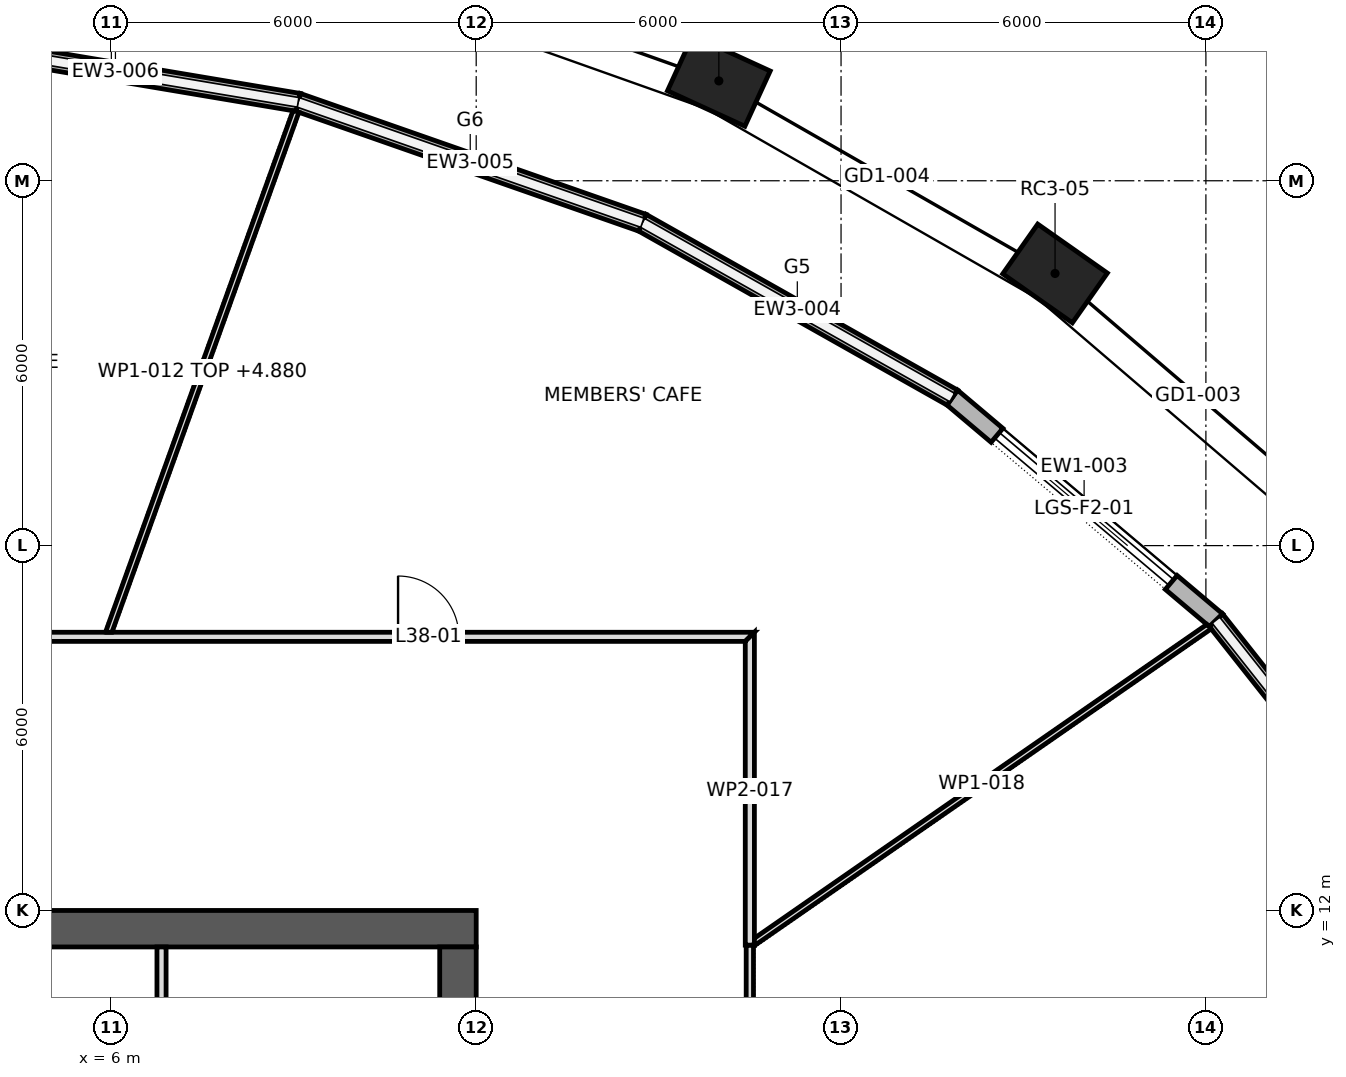
"""IFC4 building model, lengths in metres.
Left out: names, types, materials, properties, quantities, classifications, styles, units other than length and angle.
Written with IfcOpenShell. Run it as: python <this file> out.ifc"""

import sys

from ifc_helpers import new_model, si_unit, direction, frame, frame_2d, origin, origin_2d, place, context, subcontext, project, spatial, polyline, rectangle, outline, extrude, element, fill, save


model = new_model("IFC4")
c1 = context("Model", 3, precision=1e-05, world=origin(), true_north=direction((0.0, 1.0)))
c2 = subcontext(c1, "Body", "Model", "MODEL_VIEW")
j1 = project(units=[si_unit("LENGTHUNIT", "METRE"), si_unit("PLANEANGLEUNIT", "RADIAN")], contexts=[c1])
p1 = place(None, origin())
s1 = spatial("IfcSite", under=j1, at=p1, CompositionType="ELEMENT")
p2 = place(p1, origin())
s2 = spatial("IfcBuilding", under=s1, at=p2, CompositionType="ELEMENT")
p3 = place(p2, frame((0.0, 0.0, 167.5)))
s3 = spatial("IfcBuildingStorey", under=s2, at=p3, CompositionType="ELEMENT", Elevation=167.5)
for number, where, z_axis, x_axis in (
    (1, (21.519, 22.475, 0.0), (0.0, 0.0, 1.0), (-0.818, 0.575, 0.0)),
    (2, (15.99, 25.642, 0.0), (0.0, 0.0, 1.0), (-0.909, 0.417, 0.0)),
):
    element("IfcColumn", number, at=place(p3, frame(where, z_axis=z_axis, x_axis=x_axis)), inside=s3, PredefinedType="COLUMN", context=c2, shape_type="SweptSolid", body=[
        extrude(rectangle(XDim=1.4, YDim=1.0, at=origin_2d()), origin(), (0.0, 0.0, 1.0), 6.0),
    ])
p4 = place(p3, frame((-12.0, 11.7, 0.0), z_axis=(0.0, 0.0, 1.0), x_axis=(1.0, 0.0, 0.0)))
e3 = element("IfcWall", 3, at=p4, inside=s3, PredefinedType="SHEAR", context=c2, shape_type="SweptSolid", body=[
    extrude(rectangle(XDim=24.0, YDim=0.6, at=frame_2d((12.0, 0.0))), origin(), (0.0, 0.0, 1.0), 6.0),
])
p5 = place(p4, frame((9.025, 0.0, 0.0)))
e4 = element("IfcOpeningElement", 4, at=p5, cuts=e3, PredefinedType="OPENING", context=c2, shape_type="SweptSolid", body=[
    extrude(rectangle(XDim=0.9, YDim=2.1, at=frame_2d((0.45, 1.05))), frame((0.0, 0.312, 0.0), z_axis=(0.0, -1.0, 0.0), x_axis=(1.0, 0.0, 0.0)), (0.0, 0.0, 1.0), 0.624),
])
p6 = place(p4, frame((10.675, 0.0, 0.0)))
e5 = element("IfcOpeningElement", 5, at=p6, cuts=e3, PredefinedType="OPENING", context=c2, shape_type="SweptSolid", body=[
    extrude(rectangle(XDim=0.9, YDim=2.1, at=frame_2d((0.45, 1.05))), frame((0.0, 0.312, 0.0), z_axis=(0.0, -1.0, 0.0), x_axis=(1.0, 0.0, 0.0)), (0.0, 0.0, 1.0), 0.624),
])
p7 = place(p4, frame((4.6, 0.0, 0.0)))
e6 = element("IfcOpeningElement", 6, at=p7, cuts=e3, PredefinedType="OPENING", context=c2, shape_type="SweptSolid", body=[
    extrude(rectangle(XDim=0.8, YDim=2.1, at=frame_2d((0.4, 1.05))), frame((0.0, 0.312, 0.0), z_axis=(0.0, -1.0, 0.0), x_axis=(1.0, 0.0, 0.0)), (0.0, 0.0, 1.0), 0.624),
])
p8 = place(p4, frame((7.0, 0.0, 0.0)))
e7 = element("IfcOpeningElement", 7, at=p8, cuts=e3, PredefinedType="OPENING", context=c2, shape_type="SweptSolid", body=[
    extrude(rectangle(XDim=0.8, YDim=2.1, at=frame_2d((0.4, 1.05))), frame((0.0, 0.312, 0.0), z_axis=(0.0, -1.0, 0.0), x_axis=(1.0, 0.0, 0.0)), (0.0, 0.0, 1.0), 0.624),
])
p9 = place(p4, frame((15.85, 0.0, 0.0)))
e8 = element("IfcOpeningElement", 8, at=p9, cuts=e3, PredefinedType="OPENING", context=c2, shape_type="SweptSolid", body=[
    extrude(rectangle(XDim=0.8, YDim=2.1, at=frame_2d((0.4, 1.05))), frame((0.0, 0.312, 0.0), z_axis=(0.0, -1.0, 0.0), x_axis=(1.0, 0.0, 0.0)), (0.0, 0.0, 1.0), 0.624),
])
p10 = place(p3, frame((11.7, -11.4, 0.0), z_axis=(0.0, 0.0, 1.0), x_axis=(0.0, 1.0, 0.0)))
e9 = element("IfcWall", 9, at=p10, inside=s3, PredefinedType="SHEAR", context=c2, shape_type="SweptSolid", body=[
    extrude(rectangle(XDim=22.8, YDim=0.6, at=frame_2d((11.4, 0.0))), origin(), (0.0, 0.0, 1.0), 6.0),
])
p11 = place(p10, frame((10.2, 0.0, 0.0)))
e10 = element("IfcOpeningElement", 10, at=p11, cuts=e9, PredefinedType="OPENING", context=c2, shape_type="SweptSolid", body=[
    extrude(rectangle(XDim=2.4, YDim=2.1, at=frame_2d((1.2, 1.05))), frame((0.0, 0.312, 0.0), z_axis=(0.0, -1.0, 0.0), x_axis=(1.0, 0.0, 0.0)), (0.0, 0.0, 1.0), 0.624),
])
p12 = place(p10, frame((19.5, 0.0, 0.0)))
e11 = element("IfcOpeningElement", 11, at=p12, cuts=e9, PredefinedType="OPENING", context=c2, shape_type="SweptSolid", body=[
    extrude(rectangle(XDim=1.2, YDim=2.1, at=frame_2d((0.6, 1.05))), frame((0.0, 0.312, 0.0), z_axis=(0.0, -1.0, 0.0), x_axis=(1.0, 0.0, 0.0)), (0.0, 0.0, 1.0), 0.624),
])
p13 = place(p10, frame((2.1, 0.0, 0.0)))
e12 = element("IfcOpeningElement", 12, at=p13, cuts=e9, PredefinedType="OPENING", context=c2, shape_type="SweptSolid", body=[
    extrude(rectangle(XDim=1.2, YDim=2.1, at=frame_2d((0.6, 1.05))), frame((0.0, 0.312, 0.0), z_axis=(0.0, -1.0, 0.0), x_axis=(1.0, 0.0, 0.0)), (0.0, 0.0, 1.0), 0.624),
])
p14 = place(p3, frame((27.574, 12.467, 5.2), z_axis=(0.0, 0.0, 1.0), x_axis=(-0.620577705153, 0.784144955902, 0.0)))
e13 = element("IfcWall", 13, at=p14, inside=s3, PredefinedType="STANDARD", context=c2, shape_type="SweptSolid", body=[
    extrude(outline(polyline([(-0.016, -0.15), (5.508, -0.15), (5.478, 0.15), (0.016, 0.15), (-0.016, -0.15)])), origin(), (0.0, 0.0, 1.0), 0.45),
])
p15 = place(p3, frame((24.165, 16.774, 0.0), z_axis=(0.0, 0.0, 1.0), x_axis=(-0.764076096085, 0.645126126732, 0.0)))
e14 = element("IfcWall", 14, at=p15, inside=s3, PredefinedType="STANDARD", context=c2, shape_type="SweptSolid", body=[
    extrude(outline(polyline([(-0.015, -0.15), (5.689, -0.15), (5.661, 0.15), (0.015, 0.15), (-0.015, -0.15)])), origin(), (0.0, 0.0, 1.0), 5.65),
])
p16 = place(p15, frame((0.962, 0.0, 0.0)))
e15 = element("IfcOpeningElement", 15, at=p16, cuts=e14, PredefinedType="OPENING", context=c2, shape_type="SweptSolid", body=[
    extrude(rectangle(XDim=3.75, YDim=5.2, at=frame_2d((1.875, 2.6))), frame((0.0, 0.162, 0.0), z_axis=(0.0, -1.0, 0.0), x_axis=(1.0, 0.0, 0.0)), (0.0, 0.0, 1.0), 0.324),
])
p17 = place(p3, frame((19.829, 20.435, 5.2), z_axis=(0.0, 0.0, 1.0), x_axis=(-0.870982130072, 0.491314694565, 0.0)))
e16 = element("IfcWall", 16, at=p17, inside=s3, PredefinedType="STANDARD", context=c2, shape_type="SweptSolid", body=[
    extrude(outline(polyline([(-0.014, -0.15), (5.865, -0.15), (5.838, 0.15), (0.014, 0.15), (-0.014, -0.15)])), origin(), (0.0, 0.0, 1.0), 0.45),
])
p18 = place(p3, frame((14.732, 23.31, 5.2), z_axis=(0.0, 0.0, 1.0), x_axis=(-0.943944636678, 0.330103806228, 0.0)))
e17 = element("IfcWall", 17, at=p18, inside=s3, PredefinedType="STANDARD", context=c2, shape_type="SweptSolid", body=[
    extrude(outline(polyline([(-0.013, -0.15), (6.01, -0.15), (5.985, 0.15), (0.013, 0.15), (-0.013, -0.15)])), origin(), (0.0, 0.0, 1.0), 0.45),
])
p19 = place(p3, frame((9.071, 25.29, 5.2), z_axis=(0.0, 0.0, 1.0), x_axis=(-0.98618955457, 0.165620537547, 0.0)))
e18 = element("IfcWall", 18, at=p19, inside=s3, PredefinedType="STANDARD", context=c2, shape_type="SweptSolid", body=[
    extrude(outline(polyline([(-0.013, -0.15), (6.105, -0.15), (6.08, 0.15), (0.013, 0.15), (-0.013, -0.15)])), origin(), (0.0, 0.0, 1.0), 0.45),
])
p20 = place(p3, frame((6.825, 9.9, 0.0), z_axis=(0.0, 0.0, 1.0), x_axis=(0.0, 1.0, 0.0)))
e19 = element("IfcWall", 19, at=p20, inside=s3, PredefinedType="PARTITIONING", context=c2, shape_type="SweptSolid", body=[
    extrude(rectangle(XDim=1.5, YDim=0.15, at=frame_2d((0.75, 0.0))), origin(), (0.0, 0.0, 1.0), 5.65),
])
p21 = place(p3, frame((-16.575, 16.5, 0.0), z_axis=(0.0, 0.0, 1.0), x_axis=(1.0, 0.0, 0.0)))
e20 = element("IfcWall", 20, at=p21, inside=s3, PredefinedType="PARTITIONING", context=c2, shape_type="SweptSolid", body=[
    extrude(outline(polyline([(0.15, -0.075), (2.082, -0.075), (4.015, -0.075), (5.947, -0.075), (7.879, -0.075), (9.812, -0.075), (11.744, -0.075), (13.677, -0.075), (15.609, -0.075), (17.541, -0.075), (19.473, -0.075), (21.406, -0.075), (23.338, -0.075), (25.271, -0.075), (27.203, -0.075), (29.135, -0.075), (31.068, -0.075), (33.0, -0.075), (33.15, 0.075), (31.2, 0.075), (29.25, 0.075), (27.3, 0.075), (25.35, 0.075), (23.4, 0.075), (21.45, 0.075), (19.5, 0.075), (17.55, 0.075), (15.6, 0.075), (13.65, 0.075), (11.7, 0.075), (9.75, 0.075), (7.8, 0.075), (5.85, 0.075), (3.9, 0.075), (1.95, 0.075), (0.0, 0.075), (0.15, -0.075)])), origin(), (0.0, 0.0, 1.0), 5.65),
])
p22 = place(p21, frame((27.29, 0.0, 0.0)))
e21 = element("IfcOpeningElement", 21, at=p22, cuts=e20, PredefinedType="OPENING", context=c2, shape_type="SweptSolid", body=[
    extrude(rectangle(XDim=1.0, YDim=2.1, at=frame_2d((0.5, 1.05))), frame((0.0, 0.087, 0.0), z_axis=(0.0, -1.0, 0.0), x_axis=(1.0, 0.0, 0.0)), (0.0, 0.0, 1.0), 0.174),
])
p23 = place(p21, frame((16.075, 0.0, 0.0)))
e22 = element("IfcOpeningElement", 22, at=p23, cuts=e20, PredefinedType="OPENING", context=c2, shape_type="SweptSolid", body=[
    extrude(rectangle(XDim=1.0, YDim=2.1, at=frame_2d((0.5, 1.05))), frame((0.0, 0.087, 0.0), z_axis=(0.0, -1.0, 0.0), x_axis=(1.0, 0.0, 0.0)), (0.0, 0.0, 1.0), 0.174),
])
p24 = place(p21, frame((5.09, 0.0, 0.0)))
e23 = element("IfcOpeningElement", 23, at=p24, cuts=e20, PredefinedType="OPENING", context=c2, shape_type="SweptSolid", body=[
    extrude(rectangle(XDim=1.0, YDim=2.1, at=frame_2d((0.5, 1.05))), frame((0.0, 0.087, 0.0), z_axis=(0.0, -1.0, 0.0), x_axis=(1.0, 0.0, 0.0)), (0.0, 0.0, 1.0), 0.174),
])
p25 = place(p3, frame((5.951, 16.558, 0.0), z_axis=(0.0, 0.0, 1.0), x_axis=(0.338285385043, 0.94104356874, 0.0)))
e24 = element("IfcWall", 24, at=p25, inside=s3, PredefinedType="PARTITIONING", context=c2, shape_type="SweptSolid", body=[
    extrude(outline(polyline([(9.122, -0.05), (9.122, -0.006), (9.122, 0.003), (9.114, 0.05), (7.291, 0.05), (5.468, 0.05), (3.646, 0.05), (1.823, 0.05), (0.0, 0.05), (0.0, 0.049), (0.036, -0.05), (1.853, -0.05), (3.67, -0.05), (5.488, -0.05), (7.305, -0.05), (9.122, -0.05)])), origin(), (0.0, 0.0, 1.0), 4.88),
])
p26 = place(p3, frame((16.5, -7.45, 0.0), z_axis=(0.0, 0.0, 1.0), x_axis=(0.0, 1.0, 0.0)))
e25 = element("IfcWall", 25, at=p26, inside=s3, PredefinedType="PARTITIONING", context=c2, shape_type="SweptSolid", body=[
    extrude(rectangle(XDim=18.88, YDim=0.12, at=frame_2d((9.44, 0.0))), origin(), (0.0, 0.0, 1.0), 5.65),
])
p27 = place(p26, frame((3.51, 0.0, 0.0)))
e26 = element("IfcOpeningElement", 26, at=p27, cuts=e25, PredefinedType="OPENING", context=c2, shape_type="SweptSolid", body=[
    extrude(rectangle(XDim=1.8, YDim=2.1, at=frame_2d((0.9, 1.05))), frame((0.0, 0.072, 0.0), z_axis=(0.0, -1.0, 0.0), x_axis=(1.0, 0.0, 0.0)), (0.0, 0.0, 1.0), 0.144),
])
p28 = place(p26, frame((12.95, 0.0, 0.0)))
e27 = element("IfcOpeningElement", 27, at=p28, cuts=e25, PredefinedType="OPENING", context=c2, shape_type="SweptSolid", body=[
    extrude(rectangle(XDim=1.8, YDim=2.1, at=frame_2d((0.9, 1.05))), frame((0.0, 0.072, 0.0), z_axis=(0.0, -1.0, 0.0), x_axis=(1.0, 0.0, 0.0)), (0.0, 0.0, 1.0), 0.144),
])
p29 = place(p3, frame((16.5, 16.575, 0.0), z_axis=(0.0, 0.0, 1.0), x_axis=(0.0, -1.0, 0.0)))
e28 = element("IfcWall", 28, at=p29, inside=s3, PredefinedType="PARTITIONING", context=c2, shape_type="SweptSolid", body=[
    extrude(outline(polyline([(5.145, 0.075), (3.43, 0.075), (1.715, 0.075), (0.0, 0.075), (0.15, -0.075), (1.815, -0.075), (3.48, -0.075), (5.145, -0.075), (5.145, 0.075)])), origin(), (0.0, 0.0, 1.0), 5.65),
])
p30 = place(p3, frame((24.058, 16.672, 0.0), z_axis=(0.0, 0.0, 1.0), x_axis=(-0.821707329214, -0.56990969909, 0.0)))
e29 = element("IfcWall", 29, at=p30, inside=s3, PredefinedType="PARTITIONING", context=c2, shape_type="SweptSolid", body=[
    extrude(outline(polyline([(0.017, -0.05), (1.828, -0.05), (3.639, -0.05), (5.45, -0.05), (7.261, -0.05), (9.072, -0.05), (9.136, 0.043), (9.149, 0.034), (9.16, 0.05), (9.16, 0.05), (7.328, 0.05), (5.496, 0.05), (3.664, 0.05), (1.832, 0.05), (0.0, 0.05), (0.0, 0.048), (0.003, 0.002), (0.017, -0.05)])), origin(), (0.0, 0.0, 1.0), 5.65),
])
p31 = place(p16, origin())
e30 = element("IfcDoor", 30, at=p31, inside=s3, OperationType="DOUBLE_DOOR_SLIDING", PredefinedType="DOOR", context=c2, shape_type="SweptSolid", body=[
    extrude(rectangle(XDim=3.75, YDim=5.2, at=frame_2d((1.875, 2.6))), frame((0.0, 0.025, 0.0), z_axis=(0.0, -1.0, 0.0), x_axis=(1.0, 0.0, 0.0)), (0.0, 0.0, 1.0), 0.05),
])
fill(e15, e30)
p32 = place(p22, origin())
e31 = element("IfcDoor", 31, at=p32, inside=s3, OperationType="SINGLE_SWING_RIGHT", PredefinedType="DOOR", context=c2, shape_type="SweptSolid", body=[
    extrude(rectangle(XDim=1.0, YDim=2.1, at=frame_2d((0.5, 1.05))), frame((0.0, 0.025, 0.0), z_axis=(0.0, -1.0, 0.0), x_axis=(1.0, 0.0, 0.0)), (0.0, 0.0, 1.0), 0.05),
])
fill(e21, e31)
save(model, sys.argv[1])
